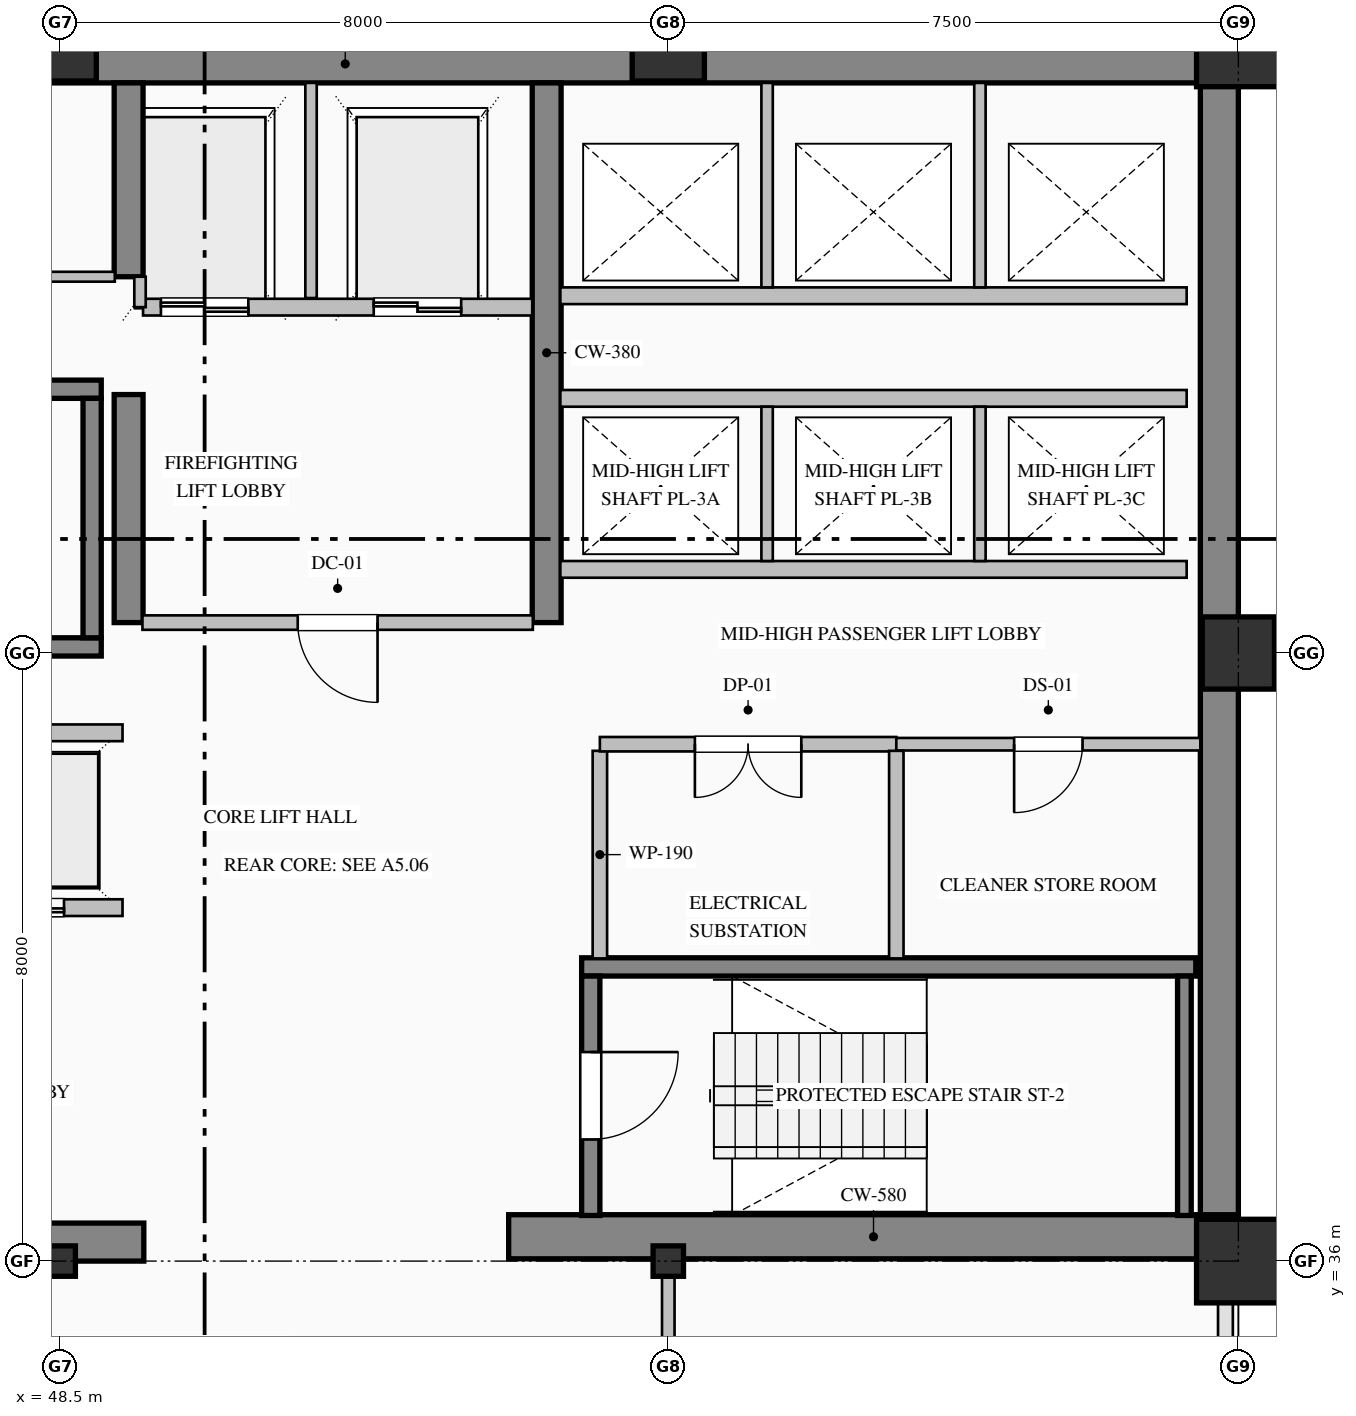
"""IFC4 building model, lengths in metres.
Left out: names, types, materials, properties, quantities, classifications, styles, units other than length and angle.
Written with IfcOpenShell. Run it as: python <this file> out.ifc"""

import sys

from ifc_helpers import new_model, si_unit, direction, frame, frame_2d, origin, origin_2d, place, context, subcontext, project, spatial, rectangle, hollow_rectangle, i_section, extrude, element, fill, save


model = new_model("IFC4")
c1 = context("Model", 3, precision=1e-05, world=origin(), true_north=direction((0.0, 1.0)))
c2 = subcontext(c1, "Body", "Model", "MODEL_VIEW")
j1 = project(units=[si_unit("LENGTHUNIT", "METRE"), si_unit("PLANEANGLEUNIT", "RADIAN")], contexts=[c1])
p1 = place(None, origin())
s1 = spatial("IfcSite", under=j1, at=p1, CompositionType="ELEMENT")
p2 = place(p1, origin())
s2 = spatial("IfcBuilding", under=s1, at=p2, CompositionType="ELEMENT")
p3 = place(p2, frame((0.0, 0.0, 119.0)))
s3 = spatial("IfcBuildingStorey", under=s2, at=p3, CompositionType="ELEMENT", Elevation=119.0)
p4 = place(p3, frame((40.5, 51.75, 0.0), z_axis=(0.0, 0.0, 1.0), x_axis=(1.0, 0.0, 0.0)))
e1 = element("IfcWall", 1, at=p4, inside=s3, PredefinedType="SHEAR", context=c2, shape_type="SweptSolid", body=[
    extrude(rectangle(XDim=23.5, YDim=0.5, at=frame_2d((11.75, 0.0))), origin(), (0.0, 0.0, 1.0), 3.765),
])
p5 = place(p3, frame((63.75, 36.32, 0.0), z_axis=(0.0, 0.0, 1.0), x_axis=(0.0, 1.0, 0.0)))
e2 = element("IfcWall", 2, at=p5, inside=s3, PredefinedType="SHEAR", context=c2, shape_type="SweptSolid", body=[
    extrude(rectangle(XDim=15.18, YDim=0.5, at=frame_2d((7.59, 0.0))), origin(), (0.0, 0.0, 1.0), 3.765),
])
p6 = place(p3, frame((40.5, 36.25, 0.0), z_axis=(0.0, 0.0, 1.0), x_axis=(1.0, 0.0, 0.0)))
e3 = element("IfcWall", 3, at=p6, inside=s3, PredefinedType="SHEAR", context=c2, shape_type="SweptSolid", body=[
    extrude(rectangle(XDim=9.1, YDim=0.5, at=frame_2d((4.55, 0.0))), origin(), (0.0, 0.0, 1.0), 3.765),
])
p7 = place(p3, frame((54.4, 36.32, 0.0), z_axis=(0.0, 0.0, 1.0), x_axis=(1.0, 0.0, 0.0)))
e4 = element("IfcWall", 4, at=p7, inside=s3, PredefinedType="SHEAR", context=c2, shape_type="SweptSolid", body=[
    extrude(rectangle(XDim=9.6, YDim=0.58, at=frame_2d((4.8, 0.0))), origin(), (0.0, 0.0, 1.0), 4.0),
])
p8 = place(p3, frame((49.4, 44.4, 0.0), z_axis=(0.0, 0.0, 1.0), x_axis=(0.0, 1.0, 0.0)))
e5 = element("IfcWall", 5, at=p8, inside=s3, PredefinedType="SHEAR", context=c2, shape_type="SweptSolid", body=[
    extrude(rectangle(XDim=3.0, YDim=0.38, at=frame_2d((1.5, 0.0))), origin(), (0.0, 0.0, 1.0), 3.765),
])
p9 = place(p3, frame((49.4, 48.95, 0.0), z_axis=(0.0, 0.0, 1.0), x_axis=(0.0, 1.0, 0.0)))
e6 = element("IfcWall", 6, at=p9, inside=s3, PredefinedType="SHEAR", context=c2, shape_type="SweptSolid", body=[
    extrude(rectangle(XDim=2.55, YDim=0.38, at=frame_2d((1.275, 0.0))), origin(), (0.0, 0.0, 1.0), 3.765),
])
p10 = place(p3, frame((54.9, 44.4, 0.0), z_axis=(0.0, 0.0, 1.0), x_axis=(0.0, 1.0, 0.0)))
e7 = element("IfcWall", 7, at=p10, inside=s3, PredefinedType="SHEAR", context=c2, shape_type="SweptSolid", body=[
    extrude(rectangle(XDim=7.1, YDim=0.38, at=frame_2d((3.55, 0.0))), origin(), (0.0, 0.0, 1.0), 3.765),
])
p11 = place(p3, frame((48.5, 36.0, 0.0), z_axis=(0.0, 0.0, 1.0), x_axis=(1.0, 0.0, 0.0)))
e8 = element("IfcColumn", 8, at=p11, inside=s3, PredefinedType="COLUMN", context=c2, shape_type="SweptSolid", body=[
    extrude(i_section(OverallWidth=0.4, OverallDepth=0.4, WebThickness=0.013, FlangeThickness=0.021, FilletRadius=0.022, at=origin_2d()), origin(), (0.0, 0.0, 1.0), 4.0),
])
p12 = place(p3, frame((48.5, 52.0, 0.0), z_axis=(0.0, 0.0, 1.0), x_axis=(1.0, 0.0, 0.0)))
e9 = element("IfcColumn", 9, at=p12, inside=s3, PredefinedType="COLUMN", context=c2, shape_type="SweptSolid", body=[
    extrude(hollow_rectangle(XDim=0.95, YDim=0.95, WallThickness=0.036, at=origin_2d()), origin(), (0.0, 0.0, 1.0), 4.0),
])
p13 = place(p3, frame((56.5, 36.0, 0.0), z_axis=(0.0, 0.0, 1.0), x_axis=(1.0, 0.0, 0.0)))
e10 = element("IfcColumn", 10, at=p13, inside=s3, PredefinedType="COLUMN", context=c2, shape_type="SweptSolid", body=[
    extrude(i_section(OverallWidth=0.4, OverallDepth=0.4, WebThickness=0.013, FlangeThickness=0.021, FilletRadius=0.022, at=origin_2d()), origin(), (0.0, 0.0, 1.0), 4.0),
])
p14 = place(p3, frame((56.5, 52.0, 0.0), z_axis=(0.0, 0.0, 1.0), x_axis=(1.0, 0.0, 0.0)))
e11 = element("IfcColumn", 11, at=p14, inside=s3, PredefinedType="COLUMN", context=c2, shape_type="SweptSolid", body=[
    extrude(hollow_rectangle(XDim=0.95, YDim=0.95, WallThickness=0.036, at=origin_2d()), origin(), (0.0, 0.0, 1.0), 4.0),
])
p15 = place(p3, frame((64.0, 36.0, 0.0), z_axis=(0.0, 0.0, 1.0), x_axis=(1.0, 0.0, 0.0)))
e12 = element("IfcColumn", 12, at=p15, inside=s3, PredefinedType="COLUMN", context=c2, shape_type="SweptSolid", body=[
    extrude(hollow_rectangle(XDim=1.1, YDim=1.1, WallThickness=0.04, at=origin_2d()), origin(), (0.0, 0.0, 1.0), 4.0),
])
p16 = place(p3, frame((64.0, 44.0, 0.0), z_axis=(0.0, 0.0, 1.0), x_axis=(1.0, 0.0, 0.0)))
e13 = element("IfcColumn", 13, at=p16, inside=s3, PredefinedType="COLUMN", context=c2, shape_type="SweptSolid", body=[
    extrude(hollow_rectangle(XDim=0.95, YDim=0.95, WallThickness=0.036, at=origin_2d()), origin(), (0.0, 0.0, 1.0), 4.0),
])
p17 = place(p3, frame((64.0, 52.0, 0.0), z_axis=(0.0, 0.0, 1.0), x_axis=(1.0, 0.0, 0.0)))
e14 = element("IfcColumn", 14, at=p17, inside=s3, PredefinedType="COLUMN", context=c2, shape_type="SweptSolid", body=[
    extrude(hollow_rectangle(XDim=1.1, YDim=1.1, WallThickness=0.04, at=origin_2d()), origin(), (0.0, 0.0, 1.0), 4.0),
])
for number, where, z_axis, x_axis in (
    (15, (40.96, 47.47, 0.0), (0.0, 0.0, 1.0), (1.0, 0.0, 0.0)),
    (16, (49.04, 44.08, 0.0), (0.0, 0.0, 1.0), (-1.0, 0.0, 0.0)),
):
    element("IfcWall", number, at=place(p3, frame(where, z_axis=z_axis, x_axis=x_axis)), inside=s3, PredefinedType="SOLIDWALL", context=c2, shape_type="SweptSolid", body=[
        extrude(rectangle(XDim=8.08, YDim=0.24, at=frame_2d((4.04, 0.0))), origin(), (0.0, 0.0, 1.0), 4.0),
    ])
p18 = place(p3, frame((48.92, 44.2, 0.0), z_axis=(0.0, 0.0, 1.0), x_axis=(0.0, 1.0, 0.0)))
e17 = element("IfcWall", 17, at=p18, inside=s3, PredefinedType="SOLIDWALL", context=c2, shape_type="SweptSolid", body=[
    extrude(rectangle(XDim=3.15, YDim=0.24, at=frame_2d((1.575, 0.0))), origin(), (0.0, 0.0, 1.0), 4.0),
])
p19 = place(p3, frame((55.36, 39.87, 0.0), z_axis=(0.0, 0.0, 1.0), x_axis=(1.0, 0.0, 0.0)))
e18 = element("IfcWall", 18, at=p19, inside=s3, PredefinedType="SOLIDWALL", context=c2, shape_type="SweptSolid", body=[
    extrude(rectangle(XDim=8.08, YDim=0.24, at=frame_2d((4.04, 0.0))), origin(), (0.0, 0.0, 1.0), 4.0),
])
p20 = place(p3, frame((55.48, 39.75, 0.0), z_axis=(0.0, 0.0, 1.0), x_axis=(0.0, -1.0, 0.0)))
e19 = element("IfcWall", 19, at=p20, inside=s3, PredefinedType="SOLIDWALL", context=c2, shape_type="SweptSolid", body=[
    extrude(rectangle(XDim=3.15, YDim=0.24, at=frame_2d((1.575, 0.0))), origin(), (0.0, 0.0, 1.0), 4.0),
])
p21 = place(p20, frame((1.0, 0.0, 0.0)))
e20 = element("IfcOpeningElement", 20, at=p21, cuts=e19, PredefinedType="OPENING", context=c2, shape_type="SweptSolid", body=[
    extrude(rectangle(XDim=1.15, YDim=2.2, at=frame_2d((0.575, 1.1))), frame((0.0, 0.13, 0.0), z_axis=(0.0, -1.0, 0.0), x_axis=(1.0, 0.0, 0.0)), (0.0, 0.0, 1.0), 0.26),
])
p22 = place(p3, frame((63.29, 36.6, 0.0), z_axis=(0.0, 0.0, 1.0), x_axis=(0.0, 1.0, 0.0)))
e21 = element("IfcWall", 21, at=p22, inside=s3, PredefinedType="SOLIDWALL", context=c2, shape_type="SweptSolid", body=[
    extrude(rectangle(XDim=3.15, YDim=0.18, at=frame_2d((1.575, 0.0))), origin(), (0.0, 0.0, 1.0), 4.0),
])
p23 = place(p3, frame((54.71, 48.55, 0.0), z_axis=(0.0, 0.0, 1.0), x_axis=(-1.0, 0.0, 0.0)))
e22 = element("IfcWall", 22, at=p23, inside=s3, PredefinedType="PARTITIONING", context=c2, shape_type="SweptSolid", body=[
    extrude(rectangle(XDim=5.12, YDim=0.22, at=frame_2d((2.56, 0.0))), origin(), (0.0, 0.0, 1.0), 3.765),
])
p24 = place(p23, frame((3.735, 0.0, 0.0)))
e23 = element("IfcOpeningElement", 23, at=p24, cuts=e22, PredefinedType="OPENING", context=c2, shape_type="SweptSolid", body=[
    extrude(rectangle(XDim=1.15, YDim=2.2, at=frame_2d((0.575, 1.1))), frame((0.0, 0.12, 0.0), z_axis=(0.0, -1.0, 0.0), x_axis=(1.0, 0.0, 0.0)), (0.0, 0.0, 1.0), 0.24),
])
p25 = place(p23, frame((0.935, 0.0, 0.0)))
e24 = element("IfcOpeningElement", 24, at=p25, cuts=e22, PredefinedType="OPENING", context=c2, shape_type="SweptSolid", body=[
    extrude(rectangle(XDim=1.15, YDim=2.2, at=frame_2d((0.575, 1.1))), frame((0.0, 0.12, 0.0), z_axis=(0.0, -1.0, 0.0), x_axis=(1.0, 0.0, 0.0)), (0.0, 0.0, 1.0), 0.24),
])
p26 = place(p3, frame((51.8, 48.67, 0.0), z_axis=(0.0, 0.0, 1.0), x_axis=(0.0, 1.0, 0.0)))
e25 = element("IfcWall", 25, at=p26, inside=s3, PredefinedType="PARTITIONING", context=c2, shape_type="SweptSolid", body=[
    extrude(rectangle(XDim=2.83, YDim=0.15, at=frame_2d((1.415, 0.0))), origin(), (0.0, 0.0, 1.0), 3.765),
])
p27 = place(p3, frame((49.55, 48.55, 0.0), z_axis=(0.0, 0.0, 1.0), x_axis=(0.0, 1.0, 0.0)))
e26 = element("IfcWall", 26, at=p27, inside=s3, PredefinedType="PARTITIONING", context=c2, shape_type="SweptSolid", body=[
    extrude(rectangle(XDim=0.4, YDim=0.15, at=frame_2d((0.2, 0.0))), origin(), (0.0, 0.0, 1.0), 3.765),
])
p28 = place(p3, frame((49.32, 40.65, 0.0), z_axis=(0.0, 0.0, 1.0), x_axis=(-1.0, 0.0, 0.0)))
e27 = element("IfcWall", 27, at=p28, inside=s3, PredefinedType="PARTITIONING", context=c2, shape_type="SweptSolid", body=[
    extrude(rectangle(XDim=8.24, YDim=0.22, at=frame_2d((4.12, 0.0))), origin(), (0.0, 0.0, 1.0), 3.765),
])
p29 = place(p28, frame((6.37, 0.0, 0.0)))
e28 = element("IfcOpeningElement", 28, at=p29, cuts=e27, PredefinedType="OPENING", context=c2, shape_type="SweptSolid", body=[
    extrude(rectangle(XDim=1.1, YDim=2.2, at=frame_2d((0.55, 1.1))), frame((0.0, 0.12, 0.0), z_axis=(0.0, -1.0, 0.0), x_axis=(1.0, 0.0, 0.0)), (0.0, 0.0, 1.0), 0.24),
])
p30 = place(p28, frame((3.57, 0.0, 0.0)))
e29 = element("IfcOpeningElement", 29, at=p30, cuts=e27, PredefinedType="OPENING", context=c2, shape_type="SweptSolid", body=[
    extrude(rectangle(XDim=1.1, YDim=2.2, at=frame_2d((0.55, 1.1))), frame((0.0, 0.12, 0.0), z_axis=(0.0, -1.0, 0.0), x_axis=(1.0, 0.0, 0.0)), (0.0, 0.0, 1.0), 0.24),
])
p31 = place(p28, frame((0.77, 0.0, 0.0)))
e30 = element("IfcOpeningElement", 30, at=p31, cuts=e27, PredefinedType="OPENING", context=c2, shape_type="SweptSolid", body=[
    extrude(rectangle(XDim=1.1, YDim=2.2, at=frame_2d((0.55, 1.1))), frame((0.0, 0.12, 0.0), z_axis=(0.0, -1.0, 0.0), x_axis=(1.0, 0.0, 0.0)), (0.0, 0.0, 1.0), 0.24),
])
for number, where, z_axis, x_axis in (
    (31, (41.08, 42.95, 0.0), (0.0, 0.0, 1.0), (1.0, 0.0, 0.0)),
    (32, (63.32, 45.1, 0.0), (0.0, 0.0, 1.0), (-1.0, 0.0, 0.0)),
    (33, (55.08, 47.35, 0.0), (0.0, 0.0, 1.0), (1.0, 0.0, 0.0)),
):
    element("IfcWall", number, at=place(p3, frame(where, z_axis=z_axis, x_axis=x_axis)), inside=s3, PredefinedType="PARTITIONING", context=c2, shape_type="SweptSolid", body=[
        extrude(rectangle(XDim=8.24, YDim=0.22, at=frame_2d((4.12, 0.0))), origin(), (0.0, 0.0, 1.0), 3.765),
    ])
for number, where, z_axis, x_axis in (
    (34, (57.8, 45.21, 0.0), (0.0, 0.0, 1.0), (0.0, 1.0, 0.0)),
    (35, (60.6, 45.21, 0.0), (0.0, 0.0, 1.0), (0.0, 1.0, 0.0)),
):
    element("IfcWall", number, at=place(p3, frame(where, z_axis=z_axis, x_axis=x_axis)), inside=s3, PredefinedType="PARTITIONING", context=c2, shape_type="SweptSolid", body=[
        extrude(rectangle(XDim=2.03, YDim=0.15, at=frame_2d((1.015, 0.0))), origin(), (0.0, 0.0, 1.0), 3.765),
    ])
p32 = place(p3, frame((63.32, 48.7, 0.0), z_axis=(0.0, 0.0, 1.0), x_axis=(-1.0, 0.0, 0.0)))
e36 = element("IfcWall", 36, at=p32, inside=s3, PredefinedType="PARTITIONING", context=c2, shape_type="SweptSolid", body=[
    extrude(rectangle(XDim=8.24, YDim=0.22, at=frame_2d((4.12, 0.0))), origin(), (0.0, 0.0, 1.0), 3.765),
])
for number, where, z_axis, x_axis in (
    (37, (57.8, 48.81, 0.0), (0.0, 0.0, 1.0), (0.0, 1.0, 0.0)),
    (38, (60.6, 48.81, 0.0), (0.0, 0.0, 1.0), (0.0, 1.0, 0.0)),
):
    element("IfcWall", number, at=place(p3, frame(where, z_axis=z_axis, x_axis=x_axis)), inside=s3, PredefinedType="PARTITIONING", context=c2, shape_type="SweptSolid", body=[
        extrude(rectangle(XDim=2.69, YDim=0.15, at=frame_2d((1.345, 0.0))), origin(), (0.0, 0.0, 1.0), 3.765),
    ])
p33 = place(p3, frame((45.2, 48.95, 0.0), z_axis=(0.0, 0.0, 1.0), x_axis=(1.0, 0.0, 0.0)))
e39 = element("IfcWall", 39, at=p33, inside=s3, PredefinedType="PARTITIONING", context=c2, shape_type="SweptSolid", body=[
    extrude(rectangle(XDim=4.018, YDim=0.13, at=frame_2d((2.009, 0.0))), origin(), (0.0, 0.0, 1.0), 3.765),
])
p34 = place(p33, frame((1.549, 0.0, 0.0)))
e40 = element("IfcOpeningElement", 40, at=p34, cuts=e39, PredefinedType="OPENING", context=c2, shape_type="SweptSolid", body=[
    extrude(rectangle(XDim=0.92, YDim=2.15, at=frame_2d((0.46, 1.075))), frame((0.0, 0.075, 0.0), z_axis=(0.0, -1.0, 0.0), x_axis=(1.0, 0.0, 0.0)), (0.0, 0.0, 1.0), 0.15),
])
p35 = place(p3, frame((54.718, 44.4, 0.0), z_axis=(0.0, 0.0, 1.0), x_axis=(-1.0, 0.0, 0.0)))
e41 = element("IfcWall", 41, at=p35, inside=s3, PredefinedType="PARTITIONING", context=c2, shape_type="SweptSolid", body=[
    extrude(rectangle(XDim=5.136, YDim=0.19, at=frame_2d((2.568, 0.0))), origin(), (0.0, 0.0, 1.0), 3.765),
])
p36 = place(p35, frame((2.043, 0.0, 0.0)))
e42 = element("IfcOpeningElement", 42, at=p36, cuts=e41, PredefinedType="OPENING", context=c2, shape_type="SweptSolid", body=[
    extrude(rectangle(XDim=1.05, YDim=2.15, at=frame_2d((0.525, 1.075))), frame((0.0, 0.105, 0.0), z_axis=(0.0, -1.0, 0.0), x_axis=(1.0, 0.0, 0.0)), (0.0, 0.0, 1.0), 0.21),
])
p37 = place(p3, frame((55.6, 42.713, 0.0), z_axis=(0.0, 0.0, 1.0), x_axis=(0.0, -1.0, 0.0)))
e43 = element("IfcWall", 43, at=p37, inside=s3, PredefinedType="PARTITIONING", context=c2, shape_type="SweptSolid", body=[
    extrude(rectangle(XDim=2.731, YDim=0.19, at=frame_2d((1.365, 0.0))), origin(), (0.0, 0.0, 1.0), 3.765),
])
p38 = place(p3, frame((59.5, 42.8, 0.0), z_axis=(0.0, 0.0, 1.0), x_axis=(-1.0, 0.0, 0.0)))
e44 = element("IfcWall", 44, at=p38, inside=s3, PredefinedType="PARTITIONING", context=c2, shape_type="SweptSolid", body=[
    extrude(rectangle(XDim=3.9, YDim=0.19, at=frame_2d((1.95, 0.0))), origin(), (0.0, 0.0, 1.0), 3.765),
])
p39 = place(p38, frame((1.25, 0.0, 0.0)))
e45 = element("IfcOpeningElement", 45, at=p39, cuts=e44, PredefinedType="OPENING", context=c2, shape_type="SweptSolid", body=[
    extrude(rectangle(XDim=1.4, YDim=2.25, at=frame_2d((0.7, 1.125))), frame((0.0, 0.105, 0.0), z_axis=(0.0, -1.0, 0.0), x_axis=(1.0, 0.0, 0.0)), (0.0, 0.0, 1.0), 0.21),
])
p40 = place(p3, frame((63.5, 42.8, 0.0), z_axis=(0.0, 0.0, 1.0), x_axis=(-1.0, 0.0, 0.0)))
e46 = element("IfcWall", 46, at=p40, inside=s3, PredefinedType="PARTITIONING", context=c2, shape_type="SweptSolid", body=[
    extrude(rectangle(XDim=4.0, YDim=0.165, at=frame_2d((2.0, 0.0))), origin(), (0.0, 0.0, 1.0), 3.765),
])
p41 = place(p40, frame((1.55, 0.0, 0.0)))
e47 = element("IfcOpeningElement", 47, at=p41, cuts=e46, PredefinedType="OPENING", context=c2, shape_type="SweptSolid", body=[
    extrude(rectangle(XDim=0.9, YDim=2.15, at=frame_2d((0.45, 1.075))), frame((0.0, 0.093, 0.0), z_axis=(0.0, -1.0, 0.0), x_axis=(1.0, 0.0, 0.0)), (0.0, 0.0, 1.0), 0.185),
])
p42 = place(p3, frame((59.5, 42.713, 0.0), z_axis=(0.0, 0.0, 1.0), x_axis=(0.0, -1.0, 0.0)))
e48 = element("IfcWall", 48, at=p42, inside=s3, PredefinedType="PARTITIONING", context=c2, shape_type="SweptSolid", body=[
    extrude(rectangle(XDim=2.731, YDim=0.19, at=frame_2d((1.365, 0.0))), origin(), (0.0, 0.0, 1.0), 3.765),
])
p43 = place(p3, frame((56.5, 36.0, 0.0), z_axis=(0.0, 0.0, 1.0), x_axis=(0.0, -1.0, 0.0)))
e49 = element("IfcWall", 49, at=p43, inside=s3, PredefinedType="PARTITIONING", context=c2, shape_type="SweptSolid", body=[
    extrude(rectangle(XDim=2.325, YDim=0.165, at=frame_2d((1.163, 0.0))), origin(), (0.0, 0.0, 1.0), 3.157),
])
p44 = place(p21, origin())
e50 = element("IfcDoor", 50, at=p44, inside=s3, OperationType="SINGLE_SWING_LEFT", PredefinedType="DOOR", context=c2, shape_type="SweptSolid", body=[
    extrude(rectangle(XDim=1.15, YDim=2.2, at=frame_2d((0.575, 1.1))), frame((0.0, 0.025, 0.0), z_axis=(0.0, -1.0, 0.0), x_axis=(1.0, 0.0, 0.0)), (0.0, 0.0, 1.0), 0.05),
])
fill(e20, e50)
p45 = place(p24, origin())
e51 = element("IfcDoor", 51, at=p45, inside=s3, OperationType="DOUBLE_DOOR_SLIDING", PredefinedType="DOOR", context=c2, shape_type="SweptSolid", body=[
    extrude(rectangle(XDim=1.15, YDim=2.2, at=frame_2d((0.575, 1.1))), frame((0.0, 0.025, 0.0), z_axis=(0.0, -1.0, 0.0), x_axis=(1.0, 0.0, 0.0)), (0.0, 0.0, 1.0), 0.05),
])
fill(e23, e51)
p46 = place(p25, origin())
e52 = element("IfcDoor", 52, at=p46, inside=s3, OperationType="DOUBLE_DOOR_SLIDING", PredefinedType="DOOR", context=c2, shape_type="SweptSolid", body=[
    extrude(rectangle(XDim=1.15, YDim=2.2, at=frame_2d((0.575, 1.1))), frame((0.0, 0.025, 0.0), z_axis=(0.0, -1.0, 0.0), x_axis=(1.0, 0.0, 0.0)), (0.0, 0.0, 1.0), 0.05),
])
fill(e24, e52)
p47 = place(p31, origin())
e53 = element("IfcDoor", 53, at=p47, inside=s3, OperationType="DOUBLE_DOOR_SLIDING", PredefinedType="DOOR", context=c2, shape_type="SweptSolid", body=[
    extrude(rectangle(XDim=1.1, YDim=2.2, at=frame_2d((0.55, 1.1))), frame((0.0, 0.025, 0.0), z_axis=(0.0, -1.0, 0.0), x_axis=(1.0, 0.0, 0.0)), (0.0, 0.0, 1.0), 0.05),
])
fill(e30, e53)
p48 = place(p36, origin())
e54 = element("IfcDoor", 54, at=p48, inside=s3, OperationType="SINGLE_SWING_LEFT", PredefinedType="DOOR", context=c2, shape_type="SweptSolid", body=[
    extrude(rectangle(XDim=1.05, YDim=2.15, at=frame_2d((0.525, 1.075))), frame((0.0, 0.025, 0.0), z_axis=(0.0, -1.0, 0.0), x_axis=(1.0, 0.0, 0.0)), (0.0, 0.0, 1.0), 0.05),
])
fill(e42, e54)
p49 = place(p39, origin())
e55 = element("IfcDoor", 55, at=p49, inside=s3, OperationType="DOUBLE_DOOR_SINGLE_SWING", PredefinedType="DOOR", context=c2, shape_type="SweptSolid", body=[
    extrude(rectangle(XDim=1.4, YDim=2.25, at=frame_2d((0.7, 1.125))), frame((0.0, 0.025, 0.0), z_axis=(0.0, -1.0, 0.0), x_axis=(1.0, 0.0, 0.0)), (0.0, 0.0, 1.0), 0.05),
])
fill(e45, e55)
p50 = place(p41, origin())
e56 = element("IfcDoor", 56, at=p50, inside=s3, OperationType="SINGLE_SWING_RIGHT", PredefinedType="DOOR", context=c2, shape_type="SweptSolid", body=[
    extrude(rectangle(XDim=0.9, YDim=2.15, at=frame_2d((0.45, 1.075))), frame((0.0, 0.025, 0.0), z_axis=(0.0, -1.0, 0.0), x_axis=(1.0, 0.0, 0.0)), (0.0, 0.0, 1.0), 0.05),
])
fill(e47, e56)
save(model, sys.argv[1])
